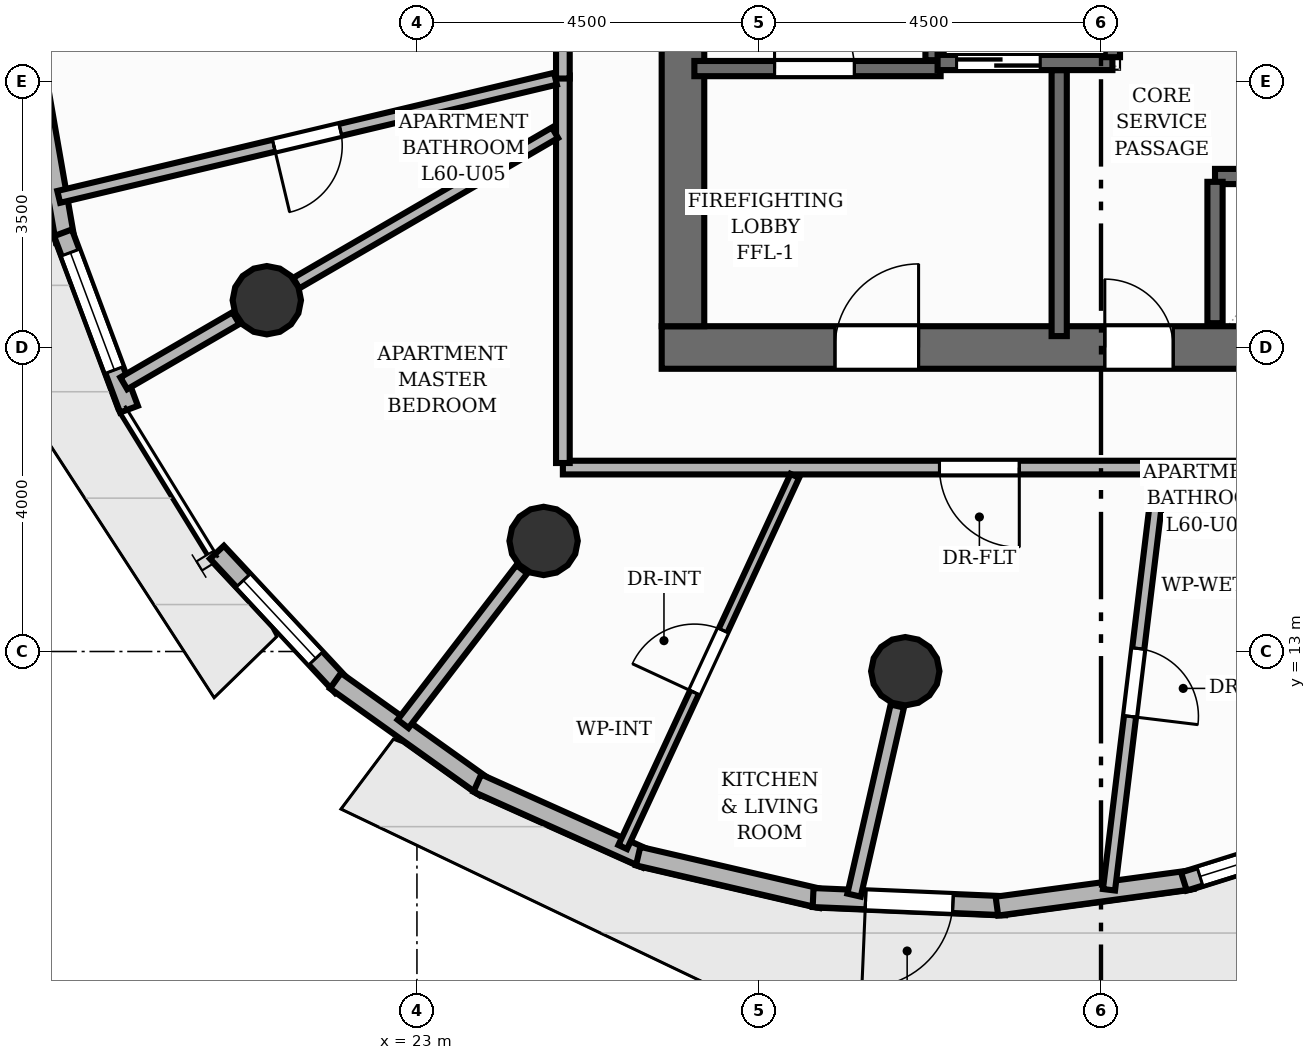
"""IFC4 building model, lengths in metres.
Left out: names, types, materials, properties, quantities, classifications, styles, units other than length and angle.
Written with IfcOpenShell. Run it as: python <this file> out.ifc"""

import sys

from ifc_helpers import new_model, si_unit, direction, frame, frame_2d, origin, origin_2d, place, context, subcontext, project, spatial, rectangle, circle, extrude, element, fill, save


model = new_model("IFC4")
c1 = context("Model", 3, precision=1e-05, world=origin(), true_north=direction((0.0, 1.0)))
c2 = subcontext(c1, "Body", "Model", "MODEL_VIEW")
j1 = project(units=[si_unit("LENGTHUNIT", "METRE"), si_unit("PLANEANGLEUNIT", "RADIAN")], contexts=[c1])
p1 = place(None, origin())
s1 = spatial("IfcSite", under=j1, at=p1, CompositionType="ELEMENT")
p2 = place(p1, origin())
s2 = spatial("IfcBuilding", under=s1, at=p2, CompositionType="ELEMENT")
p3 = place(p2, frame((0.0, 0.0, 201.44)))
s3 = spatial("IfcBuildingStorey", under=s2, at=p3, CompositionType="ELEMENT", Elevation=201.44)
p4 = place(p3, frame((26.22, 17.0, 0.0), z_axis=(0.0, 0.0, 1.0), x_axis=(1.0, 0.0, 0.0)))
e1 = element("IfcWall", 1, at=p4, inside=s3, PredefinedType="SHEAR", context=c2, shape_type="SweptSolid", body=[
    extrude(rectangle(XDim=11.56, YDim=0.56, at=frame_2d((5.78, 0.0))), origin(), (0.0, 0.0, 1.0), 3.2),
])
p5 = place(p4, frame((2.28, 0.0, 0.0)))
e2 = element("IfcOpeningElement", 2, at=p5, cuts=e1, PredefinedType="OPENING", context=c2, shape_type="SweptSolid", body=[
    extrude(rectangle(XDim=1.1, YDim=2.15, at=frame_2d((0.55, 1.075))), frame((0.0, 0.29, 0.0), z_axis=(0.0, -1.0, 0.0), x_axis=(1.0, 0.0, 0.0)), (0.0, 0.0, 1.0), 0.58),
])
p6 = place(p4, frame((5.83, 0.0, 0.0)))
e3 = element("IfcOpeningElement", 3, at=p6, cuts=e1, PredefinedType="OPENING", context=c2, shape_type="SweptSolid", body=[
    extrude(rectangle(XDim=0.9, YDim=2.1, at=frame_2d((0.45, 1.05))), frame((0.0, 0.29, 0.0), z_axis=(0.0, -1.0, 0.0), x_axis=(1.0, 0.0, 0.0)), (0.0, 0.0, 1.0), 0.58),
])
p7 = place(p3, frame((26.5, 17.28, 0.0), z_axis=(0.0, 0.0, 1.0), x_axis=(0.0, 1.0, 0.0)))
e4 = element("IfcWall", 4, at=p7, inside=s3, PredefinedType="SHEAR", context=c2, shape_type="SweptSolid", body=[
    extrude(rectangle(XDim=13.44, YDim=0.56, at=frame_2d((6.72, 0.0))), origin(), (0.0, 0.0, 1.0), 3.2),
])
for number, where, z_axis, x_axis in (
    (5, (21.025, 17.622, 0.0), (0.0, 0.0, 1.0), (1.0, 0.0, 0.0)),
    (6, (24.667, 14.455, 0.0), (0.0, 0.0, 1.0), (1.0, 0.0, 0.0)),
    (7, (29.425, 12.74, 0.0), (0.0, 0.0, 1.0), (1.0, 0.0, 0.0)),
):
    element("IfcColumn", number, at=place(p3, frame(where, z_axis=z_axis, x_axis=x_axis)), inside=s3, PredefinedType="COLUMN", context=c2, shape_type="SweptSolid", body=[
        extrude(circle(Radius=0.45, at=origin_2d()), origin(), (0.0, 0.0, 1.0), 3.2),
    ])
p8 = place(p3, frame((18.373, 18.4, 0.0), z_axis=(0.0, 0.0, 1.0), x_axis=(-0.17143069214, 0.985196182388, 0.0)))
e8 = element("IfcWall", 8, at=p8, inside=s3, PredefinedType="SOLIDWALL", context=c2, shape_type="SweptSolid", body=[
    extrude(rectangle(XDim=2.532, YDim=0.25, at=frame_2d((1.266, 0.0))), origin(), (0.0, 0.0, 1.0), 2.96),
])
p9 = place(p3, frame((19.211, 16.189, 0.0), z_axis=(0.0, 0.0, 1.0), x_axis=(-0.350367491805, 0.93661231077, 0.0)))
e9 = element("IfcWall", 9, at=p9, inside=s3, PredefinedType="SOLIDWALL", context=c2, shape_type="SweptSolid", body=[
    extrude(rectangle(XDim=2.478, YDim=0.25, at=frame_2d((1.239, 0.0))), origin(), (0.0, 0.0, 1.0), 2.96),
])
p10 = place(p9, frame((0.55, 0.0, 0.85)))
e10 = element("IfcOpeningElement", 10, at=p10, cuts=e9, PredefinedType="OPENING", context=c2, shape_type="SweptSolid", body=[
    extrude(rectangle(XDim=1.65, YDim=1.52, at=frame_2d((0.825, 0.76))), frame((0.0, 0.135, 0.0), z_axis=(0.0, -1.0, 0.0), x_axis=(1.0, 0.0, 0.0)), (0.0, 0.0, 1.0), 0.27),
])
p11 = place(p3, frame((22.015, 12.539, 0.0), z_axis=(0.0, 0.0, 1.0), x_axis=(-0.681640731319, 0.731687032417, 0.0)))
e11 = element("IfcWall", 11, at=p11, inside=s3, PredefinedType="SOLIDWALL", context=c2, shape_type="SweptSolid", body=[
    extrude(rectangle(XDim=2.415, YDim=0.25, at=frame_2d((1.208, 0.0))), origin(), (0.0, 0.0, 1.0), 2.96),
])
p12 = place(p11, frame((0.507, 0.0, 0.85)))
e12 = element("IfcOpeningElement", 12, at=p12, cuts=e11, PredefinedType="OPENING", context=c2, shape_type="SweptSolid", body=[
    extrude(rectangle(XDim=1.4, YDim=1.55, at=frame_2d((0.7, 0.775))), frame((0.0, 0.135, 0.0), z_axis=(0.0, -1.0, 0.0), x_axis=(1.0, 0.0, 0.0)), (0.0, 0.0, 1.0), 0.27),
])
p13 = place(p3, frame((23.894, 11.212, 0.0), z_axis=(0.0, 0.0, 1.0), x_axis=(-0.813794949485, 0.581152114504, 0.0)))
e13 = element("IfcWall", 13, at=p13, inside=s3, PredefinedType="SOLIDWALL", context=c2, shape_type="SweptSolid", body=[
    extrude(rectangle(XDim=2.415, YDim=0.25, at=frame_2d((1.208, 0.0))), origin(), (0.0, 0.0, 1.0), 2.96),
])
p14 = place(p3, frame((26.018, 10.271, 0.0), z_axis=(0.0, 0.0, 1.0), x_axis=(-0.912451283158, 0.409185356365, 0.0)))
e14 = element("IfcWall", 14, at=p14, inside=s3, PredefinedType="SOLIDWALL", context=c2, shape_type="SweptSolid", body=[
    extrude(rectangle(XDim=2.437, YDim=0.25, at=frame_2d((1.218, 0.0))), origin(), (0.0, 0.0, 1.0), 2.96),
])
p15 = place(p3, frame((28.324, 9.747, 0.0), z_axis=(0.0, 0.0, 1.0), x_axis=(-0.974096425092, 0.226133046286, 0.0)))
e15 = element("IfcWall", 15, at=p15, inside=s3, PredefinedType="SOLIDWALL", context=c2, shape_type="SweptSolid", body=[
    extrude(rectangle(XDim=2.478, YDim=0.25, at=frame_2d((1.239, 0.0))), origin(), (0.0, 0.0, 1.0), 2.96),
])
p16 = place(p3, frame((30.742, 9.655, 0.0), z_axis=(0.0, 0.0, 1.0), x_axis=(-0.999099670747, 0.042424614469, 0.0)))
e16 = element("IfcWall", 16, at=p16, inside=s3, PredefinedType="SOLIDWALL", context=c2, shape_type="SweptSolid", body=[
    extrude(rectangle(XDim=2.532, YDim=0.25, at=frame_2d((1.266, 0.0))), origin(), (0.0, 0.0, 1.0), 2.96),
])
p17 = place(p16, frame((0.691, 0.0, 0.0)))
e17 = element("IfcOpeningElement", 17, at=p17, cuts=e16, PredefinedType="OPENING", context=c2, shape_type="SweptSolid", body=[
    extrude(rectangle(XDim=1.15, YDim=2.2, at=frame_2d((0.575, 1.1))), frame((0.0, 0.135, 0.0), z_axis=(0.0, -1.0, 0.0), x_axis=(1.0, 0.0, 0.0)), (0.0, 0.0, 1.0), 0.27),
])
p18 = place(p3, frame((33.199, 9.998, 0.0), z_axis=(0.0, 0.0, 1.0), x_axis=(-0.990951844978, -0.134217886046, 0.0)))
e18 = element("IfcWall", 18, at=p18, inside=s3, PredefinedType="SOLIDWALL", context=c2, shape_type="SweptSolid", body=[
    extrude(rectangle(XDim=2.592, YDim=0.25, at=frame_2d((1.296, 0.0))), origin(), (0.0, 0.0, 1.0), 2.96),
])
p19 = place(p3, frame((35.621, 10.766, 0.0), z_axis=(0.0, 0.0, 1.0), x_axis=(-0.954307768746, -0.298825505122, 0.0)))
e19 = element("IfcWall", 19, at=p19, inside=s3, PredefinedType="SOLIDWALL", context=c2, shape_type="SweptSolid", body=[
    extrude(rectangle(XDim=2.651, YDim=0.25, at=frame_2d((1.326, 0.0))), origin(), (0.0, 0.0, 1.0), 2.96),
])
p20 = place(p19, frame((0.78, 0.0, 0.85)))
e20 = element("IfcOpeningElement", 20, at=p20, cuts=e19, PredefinedType="OPENING", context=c2, shape_type="SweptSolid", body=[
    extrude(rectangle(XDim=1.65, YDim=1.52, at=frame_2d((0.825, 0.76))), frame((0.0, 0.135, 0.0), z_axis=(0.0, -1.0, 0.0), x_axis=(1.0, 0.0, 0.0)), (0.0, 0.0, 1.0), 0.27),
])
p21 = place(p3, frame((29.79, 20.78, 0.0), z_axis=(0.0, 0.0, 1.0), x_axis=(0.0, 1.0, 0.0)))
e21 = element("IfcWall", 21, at=p21, inside=s3, PredefinedType="SHEAR", context=c2, shape_type="SweptSolid", body=[
    extrude(rectangle(XDim=6.44, YDim=0.2, at=frame_2d((3.22, 0.0))), origin(), (0.0, 0.0, 1.0), 3.2),
])
p22 = place(p3, frame((26.65, 20.67, 0.0), z_axis=(0.0, 0.0, 1.0), x_axis=(1.0, 0.0, 0.0)))
e22 = element("IfcWall", 22, at=p22, inside=s3, PredefinedType="SHEAR", context=c2, shape_type="SweptSolid", body=[
    extrude(rectangle(XDim=3.24, YDim=0.2, at=frame_2d((1.62, 0.0))), origin(), (0.0, 0.0, 1.0), 3.2),
])
p23 = place(p22, frame((1.055, 0.0, 0.0)))
e23 = element("IfcOpeningElement", 23, at=p23, cuts=e22, PredefinedType="OPENING", context=c2, shape_type="SweptSolid", body=[
    extrude(rectangle(XDim=1.05, YDim=2.15, at=frame_2d((0.525, 1.075))), frame((0.0, 0.11, 0.0), z_axis=(0.0, -1.0, 0.0), x_axis=(1.0, 0.0, 0.0)), (0.0, 0.0, 1.0), 0.22),
])
p24 = place(p3, frame((31.45, 17.15, 0.0), z_axis=(0.0, 0.0, 1.0), x_axis=(0.0, 1.0, 0.0)))
e24 = element("IfcWall", 24, at=p24, inside=s3, PredefinedType="SHEAR", context=c2, shape_type="SweptSolid", body=[
    extrude(rectangle(XDim=3.5, YDim=0.2, at=frame_2d((1.75, 0.0))), origin(), (0.0, 0.0, 1.0), 3.2),
])
p25 = place(p3, frame((29.85, 20.75, 0.0), z_axis=(0.0, 0.0, 1.0), x_axis=(1.0, 0.0, 0.0)))
e25 = element("IfcWall", 25, at=p25, inside=s3, PredefinedType="SHEAR", context=c2, shape_type="SweptSolid", body=[
    extrude(rectangle(XDim=2.3, YDim=0.2, at=frame_2d((1.15, 0.0))), origin(), (0.0, 0.0, 1.0), 3.2),
])
p26 = place(p25, frame((0.25, 0.0, 0.0)))
e26 = element("IfcOpeningElement", 26, at=p26, cuts=e25, PredefinedType="OPENING", context=c2, shape_type="SweptSolid", body=[
    extrude(rectangle(XDim=1.1, YDim=2.15, at=frame_2d((0.55, 1.075))), frame((0.0, 0.11, 0.0), z_axis=(0.0, -1.0, 0.0), x_axis=(1.0, 0.0, 0.0)), (0.0, 0.0, 1.0), 0.22),
])
p27 = place(p3, frame((32.15, 20.82, 0.0), z_axis=(0.0, 0.0, 1.0), x_axis=(0.0, 1.0, 0.0)))
e27 = element("IfcWall", 27, at=p27, inside=s3, PredefinedType="SHEAR", context=c2, shape_type="SweptSolid", body=[
    extrude(rectangle(XDim=1.71, YDim=0.2, at=frame_2d((0.855, 0.0))), origin(), (0.0, 0.0, 1.0), 3.2),
])
p28 = place(p3, frame((33.5, 19.25, 0.0), z_axis=(0.0, 0.0, 1.0), x_axis=(1.0, 0.0, 0.0)))
e28 = element("IfcWall", 28, at=p28, inside=s3, PredefinedType="SHEAR", context=c2, shape_type="SweptSolid", body=[
    extrude(rectangle(XDim=3.72, YDim=0.2, at=frame_2d((1.86, 0.0))), origin(), (0.0, 0.0, 1.0), 3.2),
])
p29 = place(p3, frame((33.5, 17.32, 0.0), z_axis=(0.0, 0.0, 1.0), x_axis=(0.0, 1.0, 0.0)))
e29 = element("IfcWall", 29, at=p29, inside=s3, PredefinedType="SHEAR", context=c2, shape_type="SweptSolid", body=[
    extrude(rectangle(XDim=1.86, YDim=0.2, at=frame_2d((0.93, 0.0))), origin(), (0.0, 0.0, 1.0), 3.2),
])
p30 = place(p3, frame((20.618, 17.386, 0.0), z_axis=(0.0, 0.0, 1.0), x_axis=(-0.864618511529, -0.502428929821, 0.0)))
e30 = element("IfcWall", 30, at=p30, inside=s3, PredefinedType="PARTITIONING", context=c2, shape_type="SweptSolid", body=[
    extrude(rectangle(XDim=1.706, YDim=0.18, at=frame_2d((0.853, 0.0))), origin(), (0.0, 0.0, 1.0), 2.404),
])
p31 = place(p3, frame((24.38, 14.082, 0.0), z_axis=(0.0, 0.0, 1.0), x_axis=(-0.60921849036, -0.79300241551, 0.0)))
e31 = element("IfcWall", 31, at=p31, inside=s3, PredefinedType="PARTITIONING", context=c2, shape_type="SweptSolid", body=[
    extrude(rectangle(XDim=2.565, YDim=0.18, at=frame_2d((1.283, 0.0))), origin(), (0.0, 0.0, 1.0), 2.404),
])
p32 = place(p3, frame((29.32, 12.282, 0.0), z_axis=(0.0, 0.0, 1.0), x_axis=(-0.22299363946, -0.974819899654, 0.0)))
e32 = element("IfcWall", 32, at=p32, inside=s3, PredefinedType="PARTITIONING", context=c2, shape_type="SweptSolid", body=[
    extrude(rectangle(XDim=2.552, YDim=0.18, at=frame_2d((1.276, 0.0))), origin(), (0.0, 0.0, 1.0), 2.404),
])
p33 = place(p3, frame((39.08, 15.42, 0.0), z_axis=(0.0, 0.0, 1.0), x_axis=(-1.0, 0.0, 0.0)))
e33 = element("IfcWall", 33, at=p33, inside=s3, PredefinedType="PARTITIONING", context=c2, shape_type="SweptSolid", body=[
    extrude(rectangle(XDim=14.16, YDim=0.18, at=frame_2d((7.08, 0.0))), origin(), (0.0, 0.0, 1.0), 2.955),
])
p34 = place(p33, frame((8.155, 0.0, 0.0)))
e34 = element("IfcOpeningElement", 34, at=p34, cuts=e33, PredefinedType="OPENING", context=c2, shape_type="SweptSolid", body=[
    extrude(rectangle(XDim=1.05, YDim=2.15, at=frame_2d((0.525, 1.075))), frame((0.0, 0.1, 0.0), z_axis=(0.0, -1.0, 0.0), x_axis=(1.0, 0.0, 0.0)), (0.0, 0.0, 1.0), 0.2),
])
p35 = place(p3, frame((24.92, 15.48, 0.0), z_axis=(0.0, 0.0, 1.0), x_axis=(0.0, 1.0, 0.0)))
e35 = element("IfcWall", 35, at=p35, inside=s3, PredefinedType="PARTITIONING", context=c2, shape_type="SweptSolid", body=[
    extrude(rectangle(XDim=5.1, YDim=0.18, at=frame_2d((2.55, 0.0))), origin(), (0.0, 0.0, 1.0), 2.955),
])
p36 = place(p3, frame((24.92, 20.539, 0.0), z_axis=(0.0, 0.0, 1.0), x_axis=(0.0, 1.0, 0.0)))
e36 = element("IfcWall", 36, at=p36, inside=s3, PredefinedType="PARTITIONING", context=c2, shape_type="SweptSolid", body=[
    extrude(rectangle(XDim=1.061, YDim=0.18, at=frame_2d((0.531, 0.0))), origin(), (0.0, 0.0, 1.0), 2.955),
])
p37 = place(p3, frame((32.768, 15.321, 0.0), z_axis=(0.0, 0.0, 1.0), x_axis=(-0.120556883214, -0.992706420806, 0.0)))
e37 = element("IfcWall", 37, at=p37, inside=s3, PredefinedType="PLUMBINGWALL", context=c2, shape_type="SweptSolid", body=[
    extrude(rectangle(XDim=5.496, YDim=0.16, at=frame_2d((2.748, 0.0))), origin(), (0.0, 0.0, 1.0), 2.692),
])
p38 = place(p37, frame((2.298, 0.0, 0.0)))
e38 = element("IfcOpeningElement", 38, at=p38, cuts=e37, PredefinedType="OPENING", context=c2, shape_type="SweptSolid", body=[
    extrude(rectangle(XDim=0.9, YDim=2.1, at=frame_2d((0.45, 1.05))), frame((0.0, 0.09, 0.0), z_axis=(0.0, -1.0, 0.0), x_axis=(1.0, 0.0, 0.0)), (0.0, 0.0, 1.0), 0.18),
])
p39 = place(p3, frame((25.708, 10.427, 0.0), z_axis=(0.0, 0.0, 1.0), x_axis=(0.420587579127, 0.907251943114, 0.0)))
e39 = element("IfcWall", 39, at=p39, inside=s3, PredefinedType="PARTITIONING", context=c2, shape_type="SweptSolid", body=[
    extrude(rectangle(XDim=5.383, YDim=0.125, at=frame_2d((2.692, 0.0))), origin(), (0.0, 0.0, 1.0), 2.955),
])
p40 = place(p39, frame((2.242, 0.0, 0.0)))
e40 = element("IfcOpeningElement", 40, at=p40, cuts=e39, PredefinedType="OPENING", context=c2, shape_type="SweptSolid", body=[
    extrude(rectangle(XDim=0.9, YDim=2.1, at=frame_2d((0.45, 1.05))), frame((0.0, 0.073, 0.0), z_axis=(0.0, -1.0, 0.0), x_axis=(1.0, 0.0, 0.0)), (0.0, 0.0, 1.0), 0.145),
])
p41 = place(p3, frame((21.412, 17.847, 0.0), z_axis=(0.0, 0.0, 1.0), x_axis=(0.864603029318, 0.502455571861, 0.0)))
e41 = element("IfcWall", 41, at=p41, inside=s3, PredefinedType="PLUMBINGWALL", context=c2, shape_type="SweptSolid", body=[
    extrude(rectangle(XDim=3.938, YDim=0.16, at=frame_2d((1.969, 0.0))), origin(), (0.0, 0.0, 1.0), 2.404),
])
p42 = place(p3, frame((24.823, 20.536, 0.0), z_axis=(0.0, 0.0, 1.0), x_axis=(-0.972855711428, -0.231412542317, 0.0)))
e42 = element("IfcWall", 42, at=p42, inside=s3, PredefinedType="PLUMBINGWALL", context=c2, shape_type="SweptSolid", body=[
    extrude(rectangle(XDim=6.718, YDim=0.16, at=frame_2d((3.359, 0.0))), origin(), (0.0, 0.0, 1.0), 2.692),
])
p43 = place(p42, frame((2.909, 0.0, 0.0)))
e43 = element("IfcOpeningElement", 43, at=p43, cuts=e42, PredefinedType="OPENING", context=c2, shape_type="SweptSolid", body=[
    extrude(rectangle(XDim=0.9, YDim=2.1, at=frame_2d((0.45, 1.05))), frame((0.0, 0.09, 0.0), z_axis=(0.0, -1.0, 0.0), x_axis=(1.0, 0.0, 0.0)), (0.0, 0.0, 1.0), 0.18),
])
p44 = place(p17, origin())
e44 = element("IfcDoor", 44, at=p44, inside=s3, OperationType="SINGLE_SWING_RIGHT", PredefinedType="DOOR", context=c2, shape_type="SweptSolid", body=[
    extrude(rectangle(XDim=1.15, YDim=2.2, at=frame_2d((0.575, 1.1))), frame((0.0, 0.025, 0.0), z_axis=(0.0, -1.0, 0.0), x_axis=(1.0, 0.0, 0.0)), (0.0, 0.0, 1.0), 0.05),
])
fill(e17, e44)
p45 = place(p10, origin())
e45 = element("IfcWindow", 45, at=p45, inside=s3, PartitioningType="SINGLE_PANEL", PredefinedType="WINDOW", context=c2, shape_type="SweptSolid", body=[
    extrude(rectangle(XDim=1.65, YDim=1.52, at=frame_2d((0.825, 0.76))), frame((0.0, 0.03, 0.0), z_axis=(0.0, -1.0, 0.0), x_axis=(1.0, 0.0, 0.0)), (0.0, 0.0, 1.0), 0.06),
])
fill(e10, e45)
p46 = place(p12, origin())
e46 = element("IfcWindow", 46, at=p46, inside=s3, PartitioningType="SINGLE_PANEL", PredefinedType="WINDOW", context=c2, shape_type="SweptSolid", body=[
    extrude(rectangle(XDim=1.4, YDim=1.55, at=frame_2d((0.7, 0.775))), frame((0.0, 0.03, 0.0), z_axis=(0.0, -1.0, 0.0), x_axis=(1.0, 0.0, 0.0)), (0.0, 0.0, 1.0), 0.06),
])
fill(e12, e46)
p47 = place(p20, origin())
e47 = element("IfcWindow", 47, at=p47, inside=s3, PartitioningType="SINGLE_PANEL", PredefinedType="WINDOW", context=c2, shape_type="SweptSolid", body=[
    extrude(rectangle(XDim=1.65, YDim=1.52, at=frame_2d((0.825, 0.76))), frame((0.0, 0.03, 0.0), z_axis=(0.0, -1.0, 0.0), x_axis=(1.0, 0.0, 0.0)), (0.0, 0.0, 1.0), 0.06),
])
fill(e20, e47)
p48 = place(p23, origin())
e48 = element("IfcDoor", 48, at=p48, inside=s3, OperationType="SINGLE_SWING_LEFT", PredefinedType="DOOR", context=c2, shape_type="SweptSolid", body=[
    extrude(rectangle(XDim=1.05, YDim=2.15, at=frame_2d((0.525, 1.075))), frame((0.0, 0.025, 0.0), z_axis=(0.0, -1.0, 0.0), x_axis=(1.0, 0.0, 0.0)), (0.0, 0.0, 1.0), 0.05),
])
fill(e23, e48)
p49 = place(p5, origin())
e49 = element("IfcDoor", 49, at=p49, inside=s3, OperationType="SINGLE_SWING_RIGHT", PredefinedType="DOOR", context=c2, shape_type="SweptSolid", body=[
    extrude(rectangle(XDim=1.1, YDim=2.15, at=frame_2d((0.55, 1.075))), frame((0.0, 0.025, 0.0), z_axis=(0.0, -1.0, 0.0), x_axis=(1.0, 0.0, 0.0)), (0.0, 0.0, 1.0), 0.05),
])
fill(e2, e49)
p50 = place(p26, origin())
e50 = element("IfcDoor", 50, at=p50, inside=s3, OperationType="DOUBLE_DOOR_SLIDING", PredefinedType="DOOR", context=c2, shape_type="SweptSolid", body=[
    extrude(rectangle(XDim=1.1, YDim=2.15, at=frame_2d((0.55, 1.075))), frame((0.0, 0.025, 0.0), z_axis=(0.0, -1.0, 0.0), x_axis=(1.0, 0.0, 0.0)), (0.0, 0.0, 1.0), 0.05),
])
fill(e26, e50)
p51 = place(p6, origin())
e51 = element("IfcDoor", 51, at=p51, inside=s3, OperationType="SINGLE_SWING_LEFT", PredefinedType="DOOR", context=c2, shape_type="SweptSolid", body=[
    extrude(rectangle(XDim=0.9, YDim=2.1, at=frame_2d((0.45, 1.05))), frame((0.0, 0.025, 0.0), z_axis=(0.0, -1.0, 0.0), x_axis=(1.0, 0.0, 0.0)), (0.0, 0.0, 1.0), 0.05),
])
fill(e3, e51)
p52 = place(p34, origin())
e52 = element("IfcDoor", 52, at=p52, inside=s3, OperationType="SINGLE_SWING_LEFT", PredefinedType="DOOR", context=c2, shape_type="SweptSolid", body=[
    extrude(rectangle(XDim=1.05, YDim=2.15, at=frame_2d((0.525, 1.075))), frame((0.0, 0.025, 0.0), z_axis=(0.0, -1.0, 0.0), x_axis=(1.0, 0.0, 0.0)), (0.0, 0.0, 1.0), 0.05),
])
fill(e34, e52)
p53 = place(p38, origin())
e53 = element("IfcDoor", 53, at=p53, inside=s3, OperationType="SINGLE_SWING_RIGHT", PredefinedType="DOOR", context=c2, shape_type="SweptSolid", body=[
    extrude(rectangle(XDim=0.9, YDim=2.1, at=frame_2d((0.45, 1.05))), frame((0.0, 0.025, 0.0), z_axis=(0.0, -1.0, 0.0), x_axis=(1.0, 0.0, 0.0)), (0.0, 0.0, 1.0), 0.05),
])
fill(e38, e53)
p54 = place(p40, origin())
e54 = element("IfcDoor", 54, at=p54, inside=s3, OperationType="SINGLE_SWING_LEFT", PredefinedType="DOOR", context=c2, shape_type="SweptSolid", body=[
    extrude(rectangle(XDim=0.9, YDim=2.1, at=frame_2d((0.45, 1.05))), frame((0.0, 0.025, 0.0), z_axis=(0.0, -1.0, 0.0), x_axis=(1.0, 0.0, 0.0)), (0.0, 0.0, 1.0), 0.05),
])
fill(e40, e54)
p55 = place(p43, origin())
e55 = element("IfcDoor", 55, at=p55, inside=s3, OperationType="SINGLE_SWING_RIGHT", PredefinedType="DOOR", context=c2, shape_type="SweptSolid", body=[
    extrude(rectangle(XDim=0.9, YDim=2.1, at=frame_2d((0.45, 1.05))), frame((0.0, 0.025, 0.0), z_axis=(0.0, -1.0, 0.0), x_axis=(1.0, 0.0, 0.0)), (0.0, 0.0, 1.0), 0.05),
])
fill(e43, e55)
save(model, sys.argv[1])
